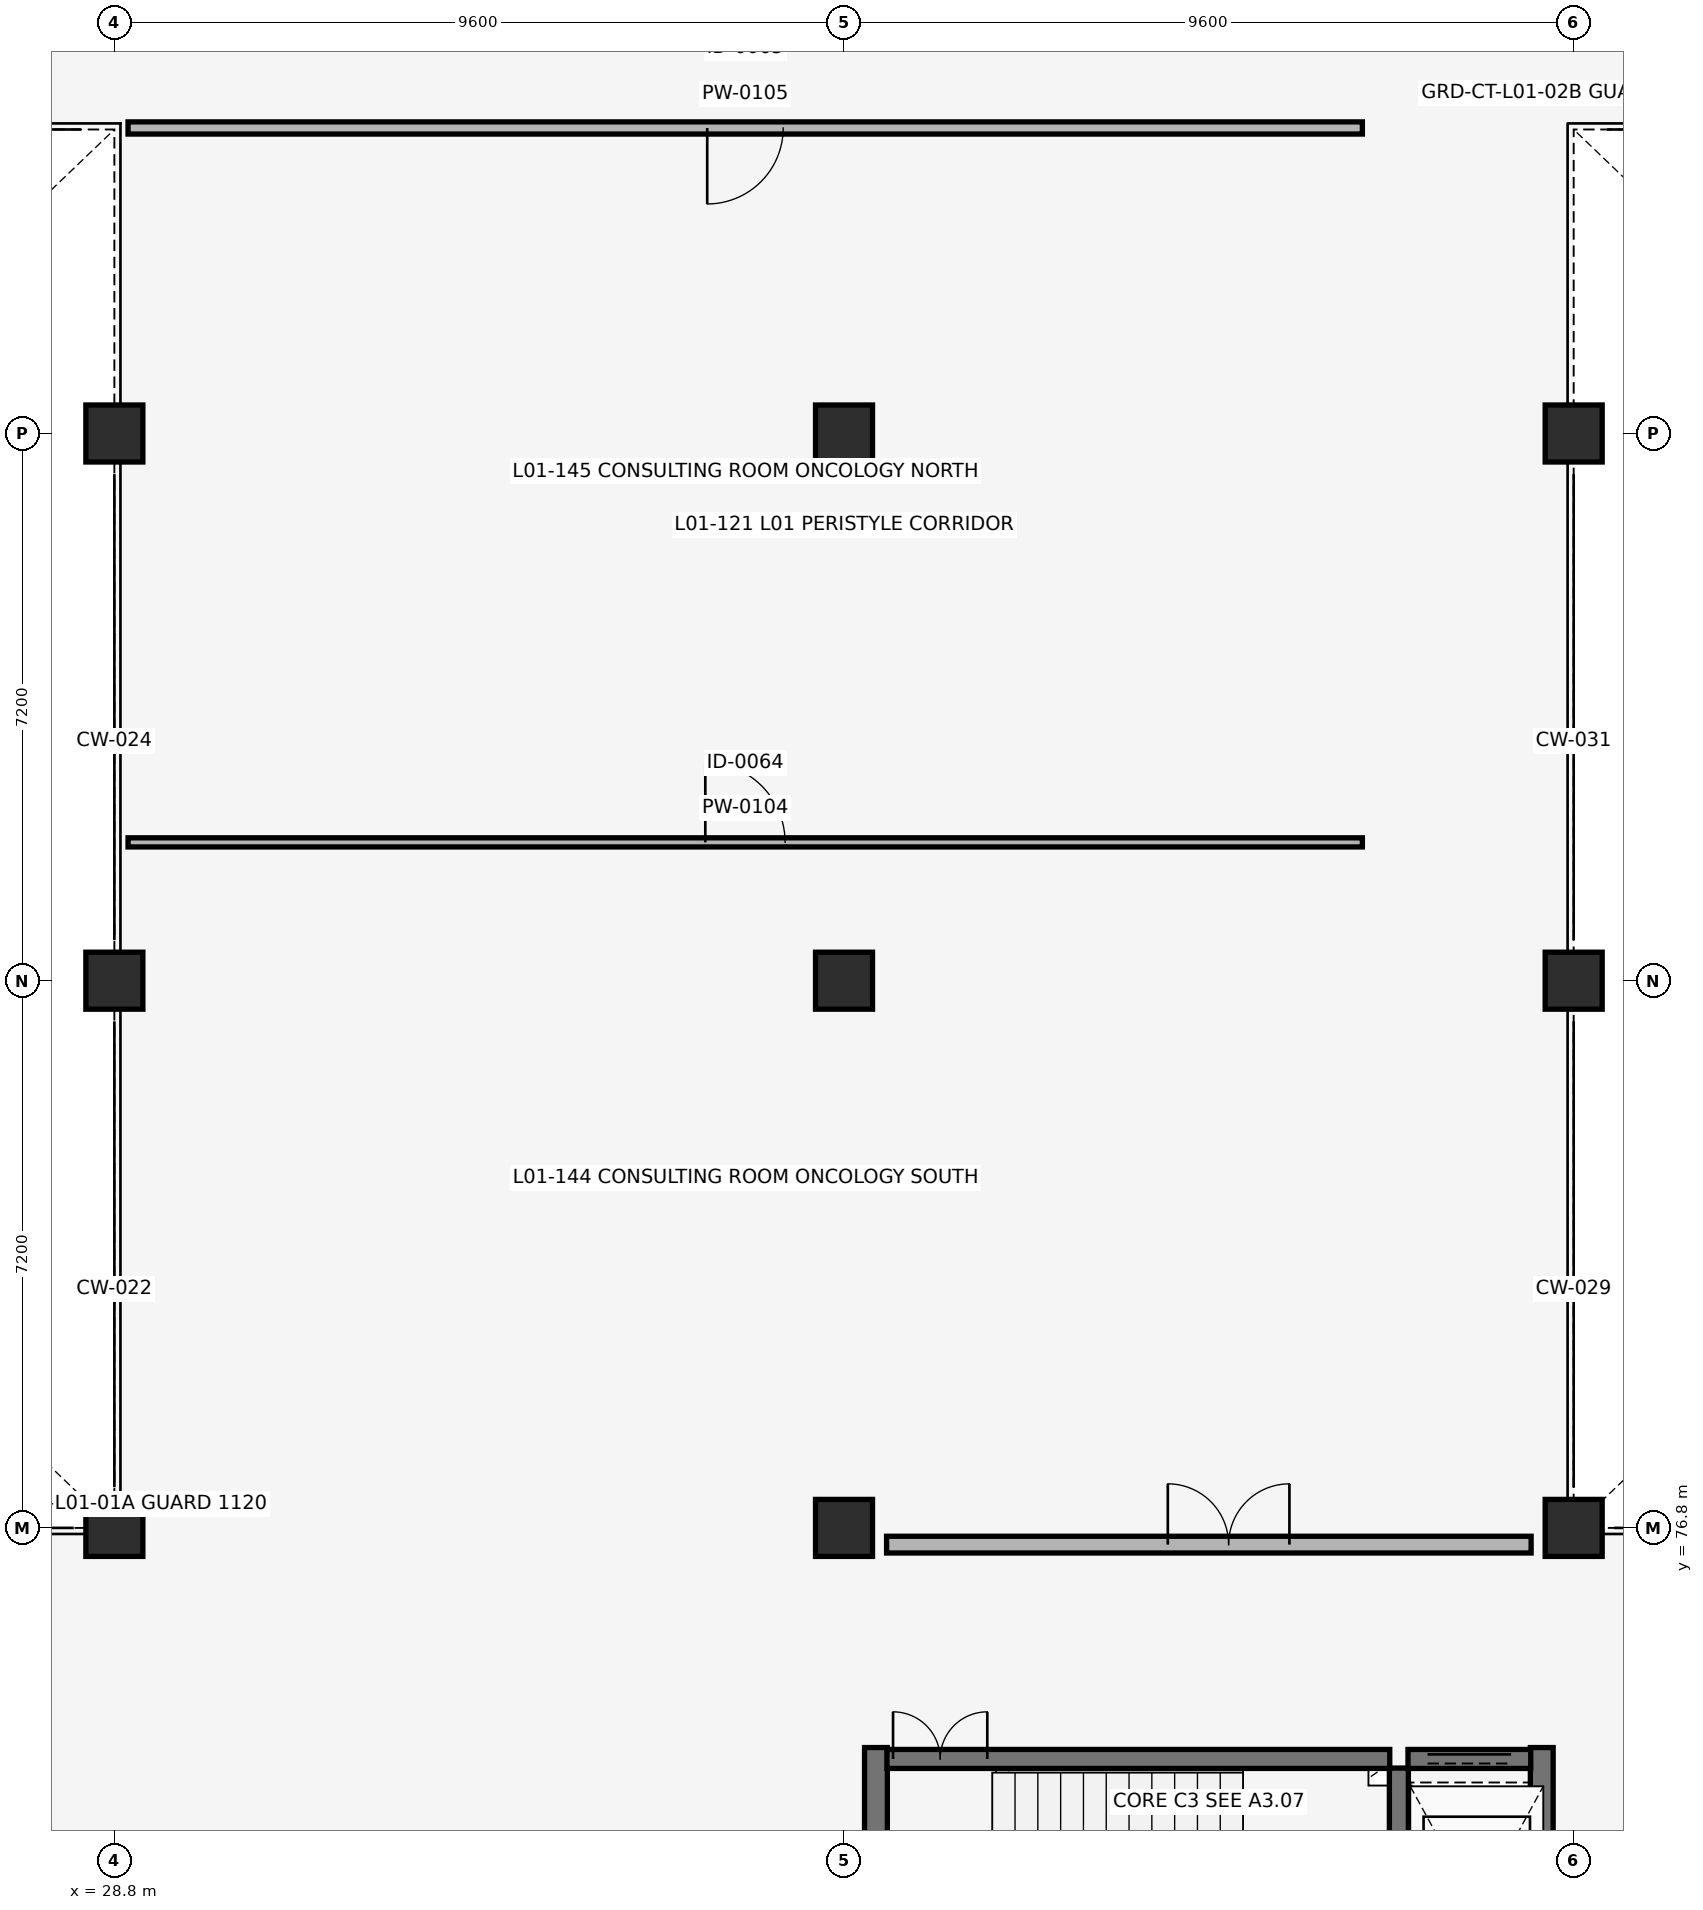
"""IFC4 building model, lengths in metres.
Left out: names, types, materials, properties, quantities, classifications, styles, units other than length and angle.
Written with IfcOpenShell. Run it as: python <this file> out.ifc"""

import sys

from ifc_helpers import new_model, si_unit, direction, frame, frame_2d, origin, origin_2d, place, context, subcontext, project, spatial, rectangle, extrude, element, fill, save


model = new_model("IFC4")
c1 = context("Model", 3, precision=1e-05, world=origin(), true_north=direction((0.0, 1.0)))
c2 = subcontext(c1, "Body", "Model", "MODEL_VIEW")
j1 = project(units=[si_unit("LENGTHUNIT", "METRE"), si_unit("PLANEANGLEUNIT", "RADIAN")], contexts=[c1])
p1 = place(None, origin())
s1 = spatial("IfcSite", under=j1, at=p1, CompositionType="ELEMENT")
p2 = place(p1, origin())
s2 = spatial("IfcBuilding", under=s1, at=p2, CompositionType="ELEMENT")
p3 = place(p2, frame((0.0, 0.0, 4.42)))
s3 = spatial("IfcBuildingStorey", under=s2, at=p3, CompositionType="ELEMENT", Elevation=4.42)
for number, where, z_axis, x_axis in (
    (1, (28.8, 76.8, 0.0), (0.0, 0.0, 1.0), (1.0, 0.0, 0.0)),
    (2, (28.8, 84.0, 0.0), (0.0, 0.0, 1.0), (1.0, 0.0, 0.0)),
    (3, (28.8, 91.2, 0.0), (0.0, 0.0, 1.0), (1.0, 0.0, 0.0)),
    (4, (38.4, 76.8, 0.0), (0.0, 0.0, 1.0), (1.0, 0.0, 0.0)),
    (5, (38.4, 84.0, 0.0), (0.0, 0.0, 1.0), (1.0, 0.0, 0.0)),
    (6, (38.4, 91.2, 0.0), (0.0, 0.0, 1.0), (1.0, 0.0, 0.0)),
    (7, (48.0, 76.8, 0.0), (0.0, 0.0, 1.0), (1.0, 0.0, 0.0)),
    (8, (48.0, 84.0, 0.0), (0.0, 0.0, 1.0), (1.0, 0.0, 0.0)),
    (9, (48.0, 91.2, 0.0), (0.0, 0.0, 1.0), (1.0, 0.0, 0.0)),
):
    element("IfcColumn", number, at=place(p3, frame(where, z_axis=z_axis, x_axis=x_axis)), inside=s3, PredefinedType="COLUMN", context=c2, shape_type="SweptSolid", body=[
        extrude(rectangle(XDim=0.75, YDim=0.75, at=origin_2d()), origin(), (0.0, 0.0, 1.0), 4.08),
    ])
for number, where, z_axis, x_axis in (
    (10, (38.82, 69.81, 0.0), (0.0, 0.0, 1.0), (0.0, 1.0, 0.0)),
    (11, (47.58, 69.81, 0.0), (0.0, 0.0, 1.0), (0.0, 1.0, 0.0)),
):
    element("IfcWall", number, at=place(p3, frame(where, z_axis=z_axis, x_axis=x_axis)), inside=s3, PredefinedType="SHEAR", context=c2, shape_type="SweptSolid", body=[
        extrude(rectangle(XDim=4.1, YDim=0.3, at=frame_2d((2.05, 0.0))), origin(), (0.0, 0.0, 1.0), 3.8),
    ])
p4 = place(p3, frame((45.7, 70.11, 0.0), z_axis=(0.0, 0.0, 1.0), x_axis=(0.0, 1.0, 0.0)))
e12 = element("IfcWall", 12, at=p4, inside=s3, PredefinedType="SHEAR", context=c2, shape_type="SweptSolid", body=[
    extrude(rectangle(XDim=3.53, YDim=0.25, at=frame_2d((1.765, 0.0))), origin(), (0.0, 0.0, 1.0), 3.8),
])
p5 = place(p3, frame((38.965, 73.76, 0.0), z_axis=(0.0, 0.0, 1.0), x_axis=(1.0, 0.0, 0.0)))
e13 = element("IfcWall", 13, at=p5, inside=s3, PredefinedType="SHEAR", context=c2, shape_type="SweptSolid", body=[
    extrude(rectangle(XDim=6.615, YDim=0.25, at=frame_2d((3.308, 0.0))), origin(), (0.0, 0.0, 1.0), 3.8),
])
p6 = place(p5, frame((0.08, 0.0, 0.0)))
e14 = element("IfcOpeningElement", 14, at=p6, cuts=e13, PredefinedType="OPENING", context=c2, shape_type="SweptSolid", body=[
    extrude(rectangle(XDim=1.24, YDim=2.15, at=frame_2d((0.62, 1.075))), frame((0.0, 0.135, 0.0), z_axis=(0.0, -1.0, 0.0), x_axis=(1.0, 0.0, 0.0)), (0.0, 0.0, 1.0), 0.27),
])
p7 = place(p3, frame((38.96, 76.58, 0.0), z_axis=(0.0, 0.0, 1.0), x_axis=(1.0, 0.0, 0.0)))
e15 = element("IfcWall", 15, at=p7, inside=s3, PredefinedType="PARTITIONING", context=c2, shape_type="SweptSolid", body=[
    extrude(rectangle(XDim=8.48, YDim=0.22, at=frame_2d((4.24, 0.0))), origin(), (0.0, 0.0, 1.0), 3.13),
])
p8 = place(p7, frame((3.7, 0.0, 0.0)))
e16 = element("IfcOpeningElement", 16, at=p8, cuts=e15, PredefinedType="OPENING", context=c2, shape_type="SweptSolid", body=[
    extrude(rectangle(XDim=1.6, YDim=2.2, at=frame_2d((0.8, 1.1))), frame((0.0, 0.12, 0.0), z_axis=(0.0, -1.0, 0.0), x_axis=(1.0, 0.0, 0.0)), (0.0, 0.0, 1.0), 0.24),
])
p9 = place(p3, frame((45.82, 73.76, 0.0), z_axis=(0.0, 0.0, 1.0), x_axis=(1.0, 0.0, 0.0)))
e17 = element("IfcWall", 17, at=p9, inside=s3, PredefinedType="SHEAR", context=c2, shape_type="SweptSolid", body=[
    extrude(rectangle(XDim=1.615, YDim=0.25, at=frame_2d((0.808, 0.0))), origin(), (0.0, 0.0, 1.0), 3.8),
])
p10 = place(p9, frame((0.258, 0.0, 0.0)))
e18 = element("IfcOpeningElement", 18, at=p10, cuts=e17, PredefinedType="OPENING", context=c2, shape_type="SweptSolid", body=[
    extrude(rectangle(XDim=1.1, YDim=2.15, at=frame_2d((0.55, 1.075))), frame((0.0, 0.135, 0.0), z_axis=(0.0, -1.0, 0.0), x_axis=(1.0, 0.0, 0.0)), (0.0, 0.0, 1.0), 0.27),
])
p11 = place(p3, frame((28.98, 85.82, 0.0), z_axis=(0.0, 0.0, 1.0), x_axis=(1.0, 0.0, 0.0)))
e19 = element("IfcWall", 19, at=p11, inside=s3, PredefinedType="PARTITIONING", context=c2, shape_type="SweptSolid", body=[
    extrude(rectangle(XDim=16.24, YDim=0.12, at=frame_2d((8.12, 0.0))), origin(), (0.0, 0.0, 1.0), 3.12),
])
p12 = place(p11, frame((7.595, 0.0, 0.0)))
e20 = element("IfcOpeningElement", 20, at=p12, cuts=e19, PredefinedType="OPENING", context=c2, shape_type="SweptSolid", body=[
    extrude(rectangle(XDim=1.05, YDim=2.1, at=frame_2d((0.525, 1.05))), frame((0.0, 0.07, 0.0), z_axis=(0.0, -1.0, 0.0), x_axis=(1.0, 0.0, 0.0)), (0.0, 0.0, 1.0), 0.14),
])
p13 = place(p3, frame((28.98, 95.22, 0.0), z_axis=(0.0, 0.0, 1.0), x_axis=(1.0, 0.0, 0.0)))
e21 = element("IfcWall", 21, at=p13, inside=s3, PredefinedType="PARTITIONING", context=c2, shape_type="SweptSolid", body=[
    extrude(rectangle(XDim=16.24, YDim=0.16, at=frame_2d((8.12, 0.0))), origin(), (0.0, 0.0, 1.0), 3.12),
])
p14 = place(p13, frame((7.62, 0.0, 0.0)))
e22 = element("IfcOpeningElement", 22, at=p14, cuts=e21, PredefinedType="OPENING", context=c2, shape_type="SweptSolid", body=[
    extrude(rectangle(XDim=1.0, YDim=2.1, at=frame_2d((0.5, 1.05))), frame((0.0, 0.09, 0.0), z_axis=(0.0, -1.0, 0.0), x_axis=(1.0, 0.0, 0.0)), (0.0, 0.0, 1.0), 0.18),
])
p15 = place(p6, origin())
e23 = element("IfcDoor", 23, at=p15, inside=s3, OperationType="DOUBLE_DOOR_SINGLE_SWING", PredefinedType="DOOR", context=c2, shape_type="SweptSolid", body=[
    extrude(rectangle(XDim=1.24, YDim=2.15, at=frame_2d((0.62, 1.075))), frame((0.0, 0.025, 0.0), z_axis=(0.0, -1.0, 0.0), x_axis=(1.0, 0.0, 0.0)), (0.0, 0.0, 1.0), 0.05),
])
fill(e14, e23)
p16 = place(p8, origin())
e24 = element("IfcDoor", 24, at=p16, inside=s3, OperationType="DOUBLE_DOOR_SINGLE_SWING", PredefinedType="DOOR", context=c2, shape_type="SweptSolid", body=[
    extrude(rectangle(XDim=1.6, YDim=2.2, at=frame_2d((0.8, 1.1))), frame((0.0, 0.025, 0.0), z_axis=(0.0, -1.0, 0.0), x_axis=(1.0, 0.0, 0.0)), (0.0, 0.0, 1.0), 0.05),
])
fill(e16, e24)
p17 = place(p10, origin())
e25 = element("IfcDoor", 25, at=p17, inside=s3, OperationType="DOUBLE_DOOR_SLIDING", PredefinedType="DOOR", context=c2, shape_type="SweptSolid", body=[
    extrude(rectangle(XDim=1.1, YDim=2.15, at=frame_2d((0.55, 1.075))), frame((0.0, 0.025, 0.0), z_axis=(0.0, -1.0, 0.0), x_axis=(1.0, 0.0, 0.0)), (0.0, 0.0, 1.0), 0.05),
])
fill(e18, e25)
p18 = place(p12, origin())
e26 = element("IfcDoor", 26, at=p18, inside=s3, OperationType="SINGLE_SWING_LEFT", PredefinedType="DOOR", context=c2, shape_type="SweptSolid", body=[
    extrude(rectangle(XDim=1.05, YDim=2.1, at=frame_2d((0.525, 1.05))), frame((0.0, 0.025, 0.0), z_axis=(0.0, -1.0, 0.0), x_axis=(1.0, 0.0, 0.0)), (0.0, 0.0, 1.0), 0.05),
])
fill(e20, e26)
p19 = place(p14, origin())
e27 = element("IfcDoor", 27, at=p19, inside=s3, OperationType="SINGLE_SWING_RIGHT", PredefinedType="DOOR", context=c2, shape_type="SweptSolid", body=[
    extrude(rectangle(XDim=1.0, YDim=2.1, at=frame_2d((0.5, 1.05))), frame((0.0, 0.025, 0.0), z_axis=(0.0, -1.0, 0.0), x_axis=(1.0, 0.0, 0.0)), (0.0, 0.0, 1.0), 0.05),
])
fill(e22, e27)
save(model, sys.argv[1])
